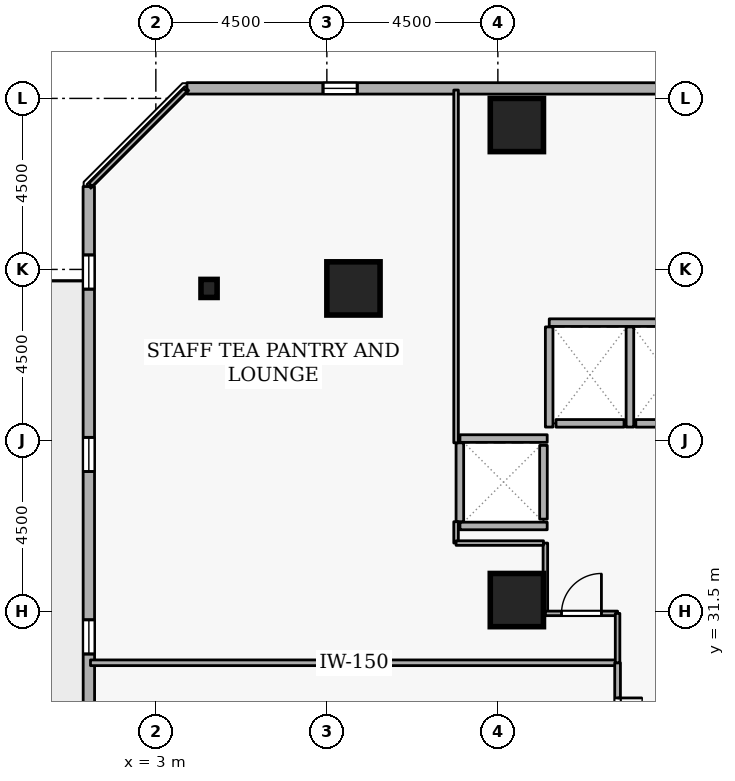
"""IFC4 building model, lengths in metres.
Left out: names, types, materials, properties, quantities, classifications, styles, units other than length and angle.
Written with IfcOpenShell. Run it as: python <this file> out.ifc"""

import sys

from ifc_helpers import new_model, si_unit, direction, frame, frame_2d, origin, origin_2d, place, context, subcontext, project, spatial, rectangle, i_section, extrude, element, fill, save


model = new_model("IFC4")
c1 = context("Model", 3, precision=1e-05, world=origin(), true_north=direction((0.0, 1.0)))
c2 = subcontext(c1, "Body", "Model", "MODEL_VIEW")
j1 = project(units=[si_unit("LENGTHUNIT", "METRE"), si_unit("PLANEANGLEUNIT", "RADIAN")], contexts=[c1])
p1 = place(None, origin())
s1 = spatial("IfcSite", under=j1, at=p1, CompositionType="ELEMENT")
p2 = place(p1, origin())
s2 = spatial("IfcBuilding", under=s1, at=p2, CompositionType="ELEMENT")
p3 = place(p2, frame((0.0, 0.0, 42.3)))
s3 = spatial("IfcBuildingStorey", under=s2, at=p3, CompositionType="ELEMENT", Elevation=42.3)
for number, where, z_axis, x_axis in (
    (1, (12.5, 44.3, 0.0), (0.0, 0.0, 1.0), (1.0, 0.0, 0.0)),
    (2, (8.2, 40.0, 0.0), (0.0, 0.0, 1.0), (1.0, 0.0, 0.0)),
    (3, (12.5, 31.8, 0.0), (0.0, 0.0, 1.0), (1.0, 0.0, 0.0)),
):
    element("IfcColumn", number, at=place(p3, frame(where, z_axis=z_axis, x_axis=x_axis)), inside=s3, PredefinedType="COLUMN", context=c2, shape_type="SweptSolid", body=[
        extrude(rectangle(XDim=1.4, YDim=1.4, at=origin_2d()), origin(), (0.0, 0.0, 1.0), 3.6),
    ])
p4 = place(p3, frame((4.4, 40.0, 0.0), z_axis=(0.0, 0.0, 1.0), x_axis=(1.0, 0.0, 0.0)))
e4 = element("IfcColumn", 4, at=p4, inside=s3, PredefinedType="COLUMN", context=c2, shape_type="SweptSolid", body=[
    extrude(i_section(OverallWidth=0.424, OverallDepth=0.475, WebThickness=0.048, FlangeThickness=0.077, FilletRadius=0.015, at=origin_2d()), origin(), (0.0, 0.0, 1.0), 3.6),
])
p5 = place(p3, frame((38.899, 45.258, 0.0), z_axis=(0.0, 0.0, 1.0), x_axis=(-0.999999978205, 0.000208784245, 0.0)))
e5 = element("IfcWall", 5, at=p5, inside=s3, PredefinedType="STANDARD", context=c2, shape_type="SweptSolid", body=[
    extrude(rectangle(XDim=35.08, YDim=0.3, at=frame_2d((17.54, 0.0))), origin(), (0.0, 0.0, 1.0), 2.7),
])
p6 = place(p5, frame((1.8, 0.0, 0.72)))
e6 = element("IfcOpeningElement", 6, at=p6, cuts=e5, PredefinedType="OPENING", context=c2, shape_type="SweptSolid", body=[
    extrude(rectangle(XDim=0.9, YDim=1.75, at=frame_2d((0.45, 0.875))), frame((0.0, 0.16, 0.0), z_axis=(0.0, -1.0, 0.0), x_axis=(1.0, 0.0, 0.0)), (0.0, 0.0, 1.0), 0.32),
])
p7 = place(p5, frame((6.6, 0.0, 0.72)))
e7 = element("IfcOpeningElement", 7, at=p7, cuts=e5, PredefinedType="OPENING", context=c2, shape_type="SweptSolid", body=[
    extrude(rectangle(XDim=0.9, YDim=1.75, at=frame_2d((0.45, 0.875))), frame((0.0, 0.16, 0.0), z_axis=(0.0, -1.0, 0.0), x_axis=(1.0, 0.0, 0.0)), (0.0, 0.0, 1.0), 0.32),
])
p8 = place(p5, frame((11.4, 0.0, 0.72)))
e8 = element("IfcOpeningElement", 8, at=p8, cuts=e5, PredefinedType="OPENING", context=c2, shape_type="SweptSolid", body=[
    extrude(rectangle(XDim=0.9, YDim=1.75, at=frame_2d((0.45, 0.875))), frame((0.0, 0.16, 0.0), z_axis=(0.0, -1.0, 0.0), x_axis=(1.0, 0.0, 0.0)), (0.0, 0.0, 1.0), 0.32),
])
p9 = place(p5, frame((16.2, 0.0, 0.72)))
e9 = element("IfcOpeningElement", 9, at=p9, cuts=e5, PredefinedType="OPENING", context=c2, shape_type="SweptSolid", body=[
    extrude(rectangle(XDim=0.9, YDim=1.75, at=frame_2d((0.45, 0.875))), frame((0.0, 0.16, 0.0), z_axis=(0.0, -1.0, 0.0), x_axis=(1.0, 0.0, 0.0)), (0.0, 0.0, 1.0), 0.32),
])
p10 = place(p5, frame((21.0, 0.0, 0.72)))
e10 = element("IfcOpeningElement", 10, at=p10, cuts=e5, PredefinedType="OPENING", context=c2, shape_type="SweptSolid", body=[
    extrude(rectangle(XDim=0.9, YDim=1.75, at=frame_2d((0.45, 0.875))), frame((0.0, 0.16, 0.0), z_axis=(0.0, -1.0, 0.0), x_axis=(1.0, 0.0, 0.0)), (0.0, 0.0, 1.0), 0.32),
])
p11 = place(p5, frame((30.6, 0.0, 0.72)))
e11 = element("IfcOpeningElement", 11, at=p11, cuts=e5, PredefinedType="OPENING", context=c2, shape_type="SweptSolid", body=[
    extrude(rectangle(XDim=0.9, YDim=1.75, at=frame_2d((0.45, 0.875))), frame((0.0, 0.16, 0.0), z_axis=(0.0, -1.0, 0.0), x_axis=(1.0, 0.0, 0.0)), (0.0, 0.0, 1.0), 0.32),
])
p12 = place(p3, frame((1.235, 42.681, 0.0), z_axis=(0.0, 0.0, 1.0), x_axis=(0.000208784245, -0.999999978205, 0.0)))
e12 = element("IfcWall", 12, at=p12, inside=s3, PredefinedType="STANDARD", context=c2, shape_type="SweptSolid", body=[
    extrude(rectangle(XDim=35.08, YDim=0.3, at=frame_2d((17.54, 0.0))), origin(), (0.0, 0.0, 1.0), 2.7),
])
p13 = place(p12, frame((19.34, 0.0, 0.0)))
e13 = element("IfcOpeningElement", 13, at=p13, cuts=e12, PredefinedType="OPENING", context=c2, shape_type="SweptSolid", body=[
    extrude(rectangle(XDim=1.0, YDim=2.08, at=frame_2d((0.5, 1.04))), frame((0.0, 0.16, 0.0), z_axis=(0.0, -1.0, 0.0), x_axis=(1.0, 0.0, 0.0)), (0.0, 0.0, 1.0), 0.32),
])
p14 = place(p12, frame((1.8, 0.0, 0.72)))
e14 = element("IfcOpeningElement", 14, at=p14, cuts=e12, PredefinedType="OPENING", context=c2, shape_type="SweptSolid", body=[
    extrude(rectangle(XDim=0.9, YDim=1.75, at=frame_2d((0.45, 0.875))), frame((0.0, 0.16, 0.0), z_axis=(0.0, -1.0, 0.0), x_axis=(1.0, 0.0, 0.0)), (0.0, 0.0, 1.0), 0.32),
])
p15 = place(p12, frame((6.6, 0.0, 0.72)))
e15 = element("IfcOpeningElement", 15, at=p15, cuts=e12, PredefinedType="OPENING", context=c2, shape_type="SweptSolid", body=[
    extrude(rectangle(XDim=0.9, YDim=1.75, at=frame_2d((0.45, 0.875))), frame((0.0, 0.16, 0.0), z_axis=(0.0, -1.0, 0.0), x_axis=(1.0, 0.0, 0.0)), (0.0, 0.0, 1.0), 0.32),
])
p16 = place(p12, frame((11.4, 0.0, 0.72)))
e16 = element("IfcOpeningElement", 16, at=p16, cuts=e12, PredefinedType="OPENING", context=c2, shape_type="SweptSolid", body=[
    extrude(rectangle(XDim=0.9, YDim=1.75, at=frame_2d((0.45, 0.875))), frame((0.0, 0.16, 0.0), z_axis=(0.0, -1.0, 0.0), x_axis=(1.0, 0.0, 0.0)), (0.0, 0.0, 1.0), 0.32),
])
p17 = place(p12, frame((16.2, 0.0, 0.72)))
e17 = element("IfcOpeningElement", 17, at=p17, cuts=e12, PredefinedType="OPENING", context=c2, shape_type="SweptSolid", body=[
    extrude(rectangle(XDim=0.9, YDim=1.75, at=frame_2d((0.45, 0.875))), frame((0.0, 0.16, 0.0), z_axis=(0.0, -1.0, 0.0), x_axis=(1.0, 0.0, 0.0)), (0.0, 0.0, 1.0), 0.32),
])
p18 = place(p12, frame((25.8, 0.0, 0.72)))
e18 = element("IfcOpeningElement", 18, at=p18, cuts=e12, PredefinedType="OPENING", context=c2, shape_type="SweptSolid", body=[
    extrude(rectangle(XDim=0.9, YDim=1.75, at=frame_2d((0.45, 0.875))), frame((0.0, 0.16, 0.0), z_axis=(0.0, -1.0, 0.0), x_axis=(1.0, 0.0, 0.0)), (0.0, 0.0, 1.0), 0.32),
])
p19 = place(p3, frame((17.37, 36.45, 0.0), z_axis=(0.0, 0.0, 1.0), x_axis=(-1.0, 0.0, 0.0)))
e19 = element("IfcWall", 19, at=p19, inside=s3, PredefinedType="STANDARD", context=c2, shape_type="SweptSolid", body=[
    extrude(rectangle(XDim=1.74, YDim=0.2, at=frame_2d((0.87, 0.0))), origin(), (0.0, 0.0, 1.0), 3.34),
])
p20 = place(p3, frame((15.32, 36.45, 0.0), z_axis=(0.0, 0.0, 1.0), x_axis=(-1.0, 0.0, 0.0)))
e20 = element("IfcWall", 20, at=p20, inside=s3, PredefinedType="STANDARD", context=c2, shape_type="SweptSolid", body=[
    extrude(rectangle(XDim=1.79, YDim=0.2, at=frame_2d((0.895, 0.0))), origin(), (0.0, 0.0, 1.0), 3.34),
])
p21 = place(p3, frame((13.2, 33.93, 0.0), z_axis=(0.0, 0.0, 1.0), x_axis=(0.0, 1.0, 0.0)))
e21 = element("IfcWall", 21, at=p21, inside=s3, PredefinedType="STANDARD", context=c2, shape_type="SweptSolid", body=[
    extrude(rectangle(XDim=1.94, YDim=0.2, at=frame_2d((0.97, 0.0))), origin(), (0.0, 0.0, 1.0), 3.34),
])
p22 = place(p3, frame((13.352, 39.1, 0.0), z_axis=(0.0, 0.0, 1.0), x_axis=(1.0, 0.0, 0.0)))
e22 = element("IfcWall", 22, at=p22, inside=s3, PredefinedType="STANDARD", context=c2, shape_type="SweptSolid", body=[
    extrude(rectangle(XDim=4.196, YDim=0.2, at=frame_2d((2.098, 0.0))), origin(), (0.0, 0.0, 1.0), 3.34),
])
for number, where, z_axis, x_axis in (
    (23, (15.475, 36.352, 0.0), (0.0, 0.0, 1.0), (0.0, 1.0, 0.0)),
    (24, (13.35, 36.352, 0.0), (0.0, 0.0, 1.0), (0.0, 1.0, 0.0)),
):
    element("IfcWall", number, at=place(p3, frame(where, z_axis=z_axis, x_axis=x_axis)), inside=s3, PredefinedType="STANDARD", context=c2, shape_type="SweptSolid", body=[
        extrude(rectangle(XDim=2.636, YDim=0.2, at=frame_2d((1.318, 0.0))), origin(), (0.0, 0.0, 1.0), 3.34),
    ])
for number, where, z_axis, x_axis in (
    (25, (11.002, 36.05, 0.0), (0.0, 0.0, 1.0), (1.0, 0.0, 0.0)),
    (26, (11.002, 33.75, 0.0), (0.0, 0.0, 1.0), (1.0, 0.0, 0.0)),
):
    element("IfcWall", number, at=place(p3, frame(where, z_axis=z_axis, x_axis=x_axis)), inside=s3, PredefinedType="STANDARD", context=c2, shape_type="SweptSolid", body=[
        extrude(rectangle(XDim=2.296, YDim=0.2, at=frame_2d((1.148, 0.0))), origin(), (0.0, 0.0, 1.0), 3.34),
    ])
p23 = place(p3, frame((11.0, 33.862, 0.0), z_axis=(0.0, 0.0, 1.0), x_axis=(0.0, 1.0, 0.0)))
e27 = element("IfcWall", 27, at=p23, inside=s3, PredefinedType="STANDARD", context=c2, shape_type="SweptSolid", body=[
    extrude(rectangle(XDim=2.076, YDim=0.2, at=frame_2d((1.038, 0.0))), origin(), (0.0, 0.0, 1.0), 3.34),
])
p24 = place(p3, frame((1.28, 30.15, 0.0), z_axis=(0.0, 0.0, 1.0), x_axis=(1.0, 0.0, 0.0)))
e28 = element("IfcWall", 28, at=p24, inside=s3, PredefinedType="PARTITIONING", context=c2, shape_type="SweptSolid", body=[
    extrude(rectangle(XDim=13.87, YDim=0.15, at=frame_2d((6.935, 0.0))), origin(), (0.0, 0.0, 1.0), 3.34),
])
p25 = place(p3, frame((15.15, 30.15, 0.0), z_axis=(0.0, 0.0, 1.0), x_axis=(0.0, -1.0, 0.0)))
e29 = element("IfcWall", 29, at=p25, inside=s3, PredefinedType="PARTITIONING", context=c2, shape_type="SweptSolid", body=[
    extrude(rectangle(XDim=3.15, YDim=0.15, at=frame_2d((1.575, 0.0))), origin(), (0.0, 0.0, 1.0), 3.34),
])
p26 = place(p25, frame((0.925, 0.0, 0.0)))
e30 = element("IfcOpeningElement", 30, at=p26, cuts=e29, PredefinedType="OPENING", context=c2, shape_type="SweptSolid", body=[
    extrude(rectangle(XDim=1.3, YDim=2.12, at=frame_2d((0.65, 1.06))), frame((0.0, 0.085, 0.0), z_axis=(0.0, -1.0, 0.0), x_axis=(1.0, 0.0, 0.0)), (0.0, 0.0, 1.0), 0.17),
])
p27 = place(p3, frame((13.25, 33.3, 0.0), z_axis=(0.0, 0.0, 1.0), x_axis=(0.0, -1.0, 0.0)))
e31 = element("IfcWall", 31, at=p27, inside=s3, PredefinedType="PARTITIONING", context=c2, shape_type="SweptSolid", body=[
    extrude(rectangle(XDim=1.85, YDim=0.12, at=frame_2d((0.925, 0.0))), origin(), (0.0, 0.0, 1.0), 3.34),
])
p28 = place(p3, frame((13.25, 31.45, 0.0), z_axis=(0.0, 0.0, 1.0), x_axis=(1.0, 0.0, 0.0)))
e32 = element("IfcWall", 32, at=p28, inside=s3, PredefinedType="PARTITIONING", context=c2, shape_type="SweptSolid", body=[
    extrude(rectangle(XDim=1.9, YDim=0.12, at=frame_2d((0.95, 0.0))), origin(), (0.0, 0.0, 1.0), 3.34),
])
p29 = place(p28, frame((0.425, 0.0, 0.0)))
e33 = element("IfcOpeningElement", 33, at=p29, cuts=e32, PredefinedType="OPENING", context=c2, shape_type="SweptSolid", body=[
    extrude(rectangle(XDim=1.05, YDim=2.1, at=frame_2d((0.525, 1.05))), frame((0.0, 0.07, 0.0), z_axis=(0.0, -1.0, 0.0), x_axis=(1.0, 0.0, 0.0)), (0.0, 0.0, 1.0), 0.14),
])
p30 = place(p3, frame((15.15, 31.45, 0.0), z_axis=(0.0, 0.0, 1.0), x_axis=(0.0, -1.0, 0.0)))
e34 = element("IfcWall", 34, at=p30, inside=s3, PredefinedType="PARTITIONING", context=c2, shape_type="SweptSolid", body=[
    extrude(rectangle(XDim=1.3, YDim=0.12, at=frame_2d((0.65, 0.0))), origin(), (0.0, 0.0, 1.0), 3.34),
])
p31 = place(p3, frame((1.28, 42.725, 0.0), z_axis=(0.0, 0.0, 1.0), x_axis=(0.707106781187, 0.707106781187, 0.0)))
e35 = element("IfcWall", 35, at=p31, inside=s3, PredefinedType="PARTITIONING", context=c2, shape_type="SweptSolid", body=[
    extrude(rectangle(XDim=3.528, YDim=0.12, at=frame_2d((1.764, 0.0))), origin(), (0.0, 0.0, 1.0), 3.34),
])
p32 = place(p3, frame((10.9, 45.22, 0.0), z_axis=(0.0, 0.0, 1.0), x_axis=(0.0, -1.0, 0.0)))
e36 = element("IfcWall", 36, at=p32, inside=s3, PredefinedType="PARTITIONING", context=c2, shape_type="SweptSolid", body=[
    extrude(rectangle(XDim=9.282, YDim=0.12, at=frame_2d((4.641, 0.0))), origin(), (0.0, 0.0, 1.0), 3.34),
])
p33 = place(p3, frame((10.9, 33.862, 0.0), z_axis=(0.0, 0.0, 1.0), x_axis=(0.0, -1.0, 0.0)))
e37 = element("IfcWall", 37, at=p33, inside=s3, PredefinedType="PARTITIONING", context=c2, shape_type="SweptSolid", body=[
    extrude(rectangle(XDim=0.562, YDim=0.12, at=frame_2d((0.281, 0.0))), origin(), (0.0, 0.0, 1.0), 3.34),
])
p34 = place(p3, frame((10.9, 33.3, 0.0), z_axis=(0.0, 0.0, 1.0), x_axis=(1.0, 0.0, 0.0)))
e38 = element("IfcWall", 38, at=p34, inside=s3, PredefinedType="PARTITIONING", context=c2, shape_type="SweptSolid", body=[
    extrude(rectangle(XDim=2.3, YDim=0.12, at=frame_2d((1.15, 0.0))), origin(), (0.0, 0.0, 1.0), 3.34),
])
p35 = place(p11, origin())
e39 = element("IfcWindow", 39, at=p35, inside=s3, PartitioningType="SINGLE_PANEL", PredefinedType="WINDOW", context=c2, shape_type="SweptSolid", body=[
    extrude(rectangle(XDim=0.9, YDim=1.75, at=frame_2d((0.45, 0.875))), frame((0.0, 0.03, 0.0), z_axis=(0.0, -1.0, 0.0), x_axis=(1.0, 0.0, 0.0)), (0.0, 0.0, 1.0), 0.06),
])
fill(e11, e39)
p36 = place(p14, origin())
e40 = element("IfcWindow", 40, at=p36, inside=s3, PartitioningType="SINGLE_PANEL", PredefinedType="WINDOW", context=c2, shape_type="SweptSolid", body=[
    extrude(rectangle(XDim=0.9, YDim=1.75, at=frame_2d((0.45, 0.875))), frame((0.0, 0.03, 0.0), z_axis=(0.0, -1.0, 0.0), x_axis=(1.0, 0.0, 0.0)), (0.0, 0.0, 1.0), 0.06),
])
fill(e14, e40)
p37 = place(p15, origin())
e41 = element("IfcWindow", 41, at=p37, inside=s3, PartitioningType="SINGLE_PANEL", PredefinedType="WINDOW", context=c2, shape_type="SweptSolid", body=[
    extrude(rectangle(XDim=0.9, YDim=1.75, at=frame_2d((0.45, 0.875))), frame((0.0, 0.03, 0.0), z_axis=(0.0, -1.0, 0.0), x_axis=(1.0, 0.0, 0.0)), (0.0, 0.0, 1.0), 0.06),
])
fill(e15, e41)
p38 = place(p16, origin())
e42 = element("IfcWindow", 42, at=p38, inside=s3, PartitioningType="SINGLE_PANEL", PredefinedType="WINDOW", context=c2, shape_type="SweptSolid", body=[
    extrude(rectangle(XDim=0.9, YDim=1.75, at=frame_2d((0.45, 0.875))), frame((0.0, 0.03, 0.0), z_axis=(0.0, -1.0, 0.0), x_axis=(1.0, 0.0, 0.0)), (0.0, 0.0, 1.0), 0.06),
])
fill(e16, e42)
p39 = place(p26, origin())
e43 = element("IfcDoor", 43, at=p39, inside=s3, OperationType="DOUBLE_DOOR_SINGLE_SWING", PredefinedType="DOOR", context=c2, shape_type="SweptSolid", body=[
    extrude(rectangle(XDim=1.3, YDim=2.12, at=frame_2d((0.65, 1.06))), frame((0.0, 0.025, 0.0), z_axis=(0.0, -1.0, 0.0), x_axis=(1.0, 0.0, 0.0)), (0.0, 0.0, 1.0), 0.05),
])
fill(e30, e43)
p40 = place(p29, origin())
e44 = element("IfcDoor", 44, at=p40, inside=s3, OperationType="SINGLE_SWING_RIGHT", PredefinedType="DOOR", context=c2, shape_type="SweptSolid", body=[
    extrude(rectangle(XDim=1.05, YDim=2.1, at=frame_2d((0.525, 1.05))), frame((0.0, 0.025, 0.0), z_axis=(0.0, -1.0, 0.0), x_axis=(1.0, 0.0, 0.0)), (0.0, 0.0, 1.0), 0.05),
])
fill(e33, e44)
save(model, sys.argv[1])
